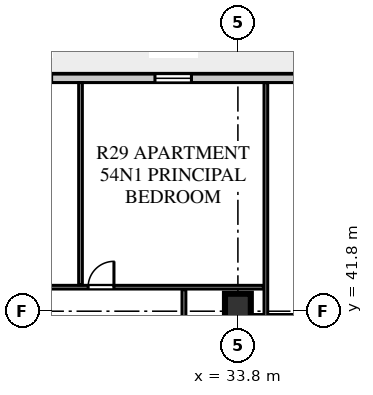
"""IFC4 building model, lengths in metres.
Left out: names, types, materials, properties, quantities, classifications, styles, units other than length and angle.
Written with IfcOpenShell. Run it as: python <this file> out.ifc"""

import sys

from ifc_helpers import new_model, si_unit, direction, frame, frame_2d, origin, origin_2d, place, context, subcontext, project, spatial, rectangle, extrude, element, fill, save


model = new_model("IFC4")
c1 = context("Model", 3, precision=1e-05, world=origin(), true_north=direction((0.0, 1.0)))
c2 = subcontext(c1, "Body", "Model", "MODEL_VIEW")
j1 = project(units=[si_unit("LENGTHUNIT", "METRE"), si_unit("PLANEANGLEUNIT", "RADIAN")], contexts=[c1])
p1 = place(None, origin())
s1 = spatial("IfcSite", under=j1, at=p1, CompositionType="ELEMENT")
p2 = place(p1, origin())
s2 = spatial("IfcBuilding", under=s1, at=p2, CompositionType="ELEMENT")
p3 = place(p2, frame((0.0, 0.0, 221.9)))
s3 = spatial("IfcBuildingStorey", under=s2, at=p3, CompositionType="ELEMENT", Elevation=221.9)
p4 = place(p3, frame((33.8, 41.95, 0.0), z_axis=(0.0, 0.0, 1.0), x_axis=(1.0, 0.0, 0.0)))
e1 = element("IfcColumn", 1, at=p4, inside=s3, PredefinedType="COLUMN", context=c2, shape_type="SweptSolid", body=[
    extrude(rectangle(XDim=0.85, YDim=0.85, at=origin_2d()), origin(), (0.0, 0.0, 1.0), 3.66),
])
p5 = place(p3, frame((45.55, 49.46, 0.0), z_axis=(0.0, 0.0, 1.0), x_axis=(-1.0, 0.0, 0.0)))
e2 = element("IfcWall", 2, at=p5, inside=s3, PredefinedType="STANDARD", context=c2, shape_type="SweptSolid", body=[
    extrude(rectangle(XDim=32.5, YDim=0.28, at=frame_2d((16.25, 0.0))), origin(), (0.0, 0.0, 1.0), 3.66),
])
p6 = place(p5, frame((30.55, 0.0, 0.0)))
e3 = element("IfcOpeningElement", 3, at=p6, cuts=e2, PredefinedType="OPENING", context=c2, shape_type="SweptSolid", body=[
    extrude(rectangle(XDim=1.0, YDim=2.05, at=frame_2d((0.5, 1.025))), frame((0.0, 0.15, 0.0), z_axis=(0.0, -1.0, 0.0), x_axis=(1.0, 0.0, 0.0)), (0.0, 0.0, 1.0), 0.3),
])
p7 = place(p5, frame((24.565, 0.0, 0.8)))
e4 = element("IfcOpeningElement", 4, at=p7, cuts=e2, PredefinedType="OPENING", context=c2, shape_type="SweptSolid", body=[
    extrude(rectangle(XDim=1.8, YDim=2.0, at=frame_2d((0.9, 1.0))), frame((0.0, 0.15, 0.0), z_axis=(0.0, -1.0, 0.0), x_axis=(1.0, 0.0, 0.0)), (0.0, 0.0, 1.0), 0.3),
])
p8 = place(p5, frame((17.878, 0.0, 0.8)))
e5 = element("IfcOpeningElement", 5, at=p8, cuts=e2, PredefinedType="OPENING", context=c2, shape_type="SweptSolid", body=[
    extrude(rectangle(XDim=1.5, YDim=2.0, at=frame_2d((0.75, 1.0))), frame((0.0, 0.15, 0.0), z_axis=(0.0, -1.0, 0.0), x_axis=(1.0, 0.0, 0.0)), (0.0, 0.0, 1.0), 0.3),
])
p9 = place(p5, frame((13.278, 0.0, 0.8)))
e6 = element("IfcOpeningElement", 6, at=p9, cuts=e2, PredefinedType="OPENING", context=c2, shape_type="SweptSolid", body=[
    extrude(rectangle(XDim=1.2, YDim=1.75, at=frame_2d((0.6, 0.875))), frame((0.0, 0.15, 0.0), z_axis=(0.0, -1.0, 0.0), x_axis=(1.0, 0.0, 0.0)), (0.0, 0.0, 1.0), 0.3),
])
p10 = place(p5, frame((4.27, 0.0, 0.8)))
e7 = element("IfcOpeningElement", 7, at=p10, cuts=e2, PredefinedType="OPENING", context=c2, shape_type="SweptSolid", body=[
    extrude(rectangle(XDim=2.4, YDim=2.05, at=frame_2d((1.2, 1.025))), frame((0.0, 0.15, 0.0), z_axis=(0.0, -1.0, 0.0), x_axis=(1.0, 0.0, 0.0)), (0.0, 0.0, 1.0), 0.3),
])
p11 = place(p3, frame((34.72, 35.22, 0.0), z_axis=(0.0, 0.0, 1.0), x_axis=(0.0, 1.0, 0.0)))
e8 = element("IfcWall", 8, at=p11, inside=s3, PredefinedType="PARTITIONING", context=c2, shape_type="SweptSolid", body=[
    extrude(rectangle(XDim=14.1, YDim=0.12, at=frame_2d((7.05, 0.0))), origin(), (0.0, 0.0, 1.0), 3.66),
])
p12 = place(p3, frame((25.3, 42.59, 0.0), z_axis=(0.0, 0.0, 1.0), x_axis=(1.0, 0.0, 0.0)))
e9 = element("IfcWall", 9, at=p12, inside=s3, PredefinedType="PARTITIONING", context=c2, shape_type="SweptSolid", body=[
    extrude(rectangle(XDim=9.34, YDim=0.12, at=frame_2d((4.67, 0.0))), origin(), (0.0, 0.0, 1.0), 3.66),
])
p13 = place(p12, frame((0.6, 0.0, 0.0)))
e10 = element("IfcOpeningElement", 10, at=p13, cuts=e9, PredefinedType="OPENING", context=c2, shape_type="SweptSolid", body=[
    extrude(rectangle(XDim=0.85, YDim=2.08, at=frame_2d((0.425, 1.04))), frame((0.0, 0.07, 0.0), z_axis=(0.0, -1.0, 0.0), x_axis=(1.0, 0.0, 0.0)), (0.0, 0.0, 1.0), 0.14),
])
p14 = place(p12, frame((3.573, 0.0, 0.0)))
e11 = element("IfcOpeningElement", 11, at=p14, cuts=e9, PredefinedType="OPENING", context=c2, shape_type="SweptSolid", body=[
    extrude(rectangle(XDim=0.85, YDim=2.08, at=frame_2d((0.425, 1.04))), frame((0.0, 0.07, 0.0), z_axis=(0.0, -1.0, 0.0), x_axis=(1.0, 0.0, 0.0)), (0.0, 0.0, 1.0), 0.14),
])
p15 = place(p3, frame((32.025, 35.3, 0.0), z_axis=(0.0, 0.0, 1.0), x_axis=(0.0, 1.0, 0.0)))
e12 = element("IfcWall", 12, at=p15, inside=s3, PredefinedType="PLUMBINGWALL", context=c2, shape_type="SweptSolid", body=[
    extrude(rectangle(XDim=7.21, YDim=0.125, at=frame_2d((3.605, 0.0))), origin(), (0.0, 0.0, 1.0), 3.66),
])
p16 = place(p15, frame((0.16, 0.0, 0.0)))
e13 = element("IfcOpeningElement", 13, at=p16, cuts=e12, PredefinedType="OPENING", context=c2, shape_type="SweptSolid", body=[
    extrude(rectangle(XDim=0.8, YDim=2.05, at=frame_2d((0.4, 1.025))), frame((0.0, 0.073, 0.0), z_axis=(0.0, -1.0, 0.0), x_axis=(1.0, 0.0, 0.0)), (0.0, 0.0, 1.0), 0.145),
])
p17 = place(p15, frame((3.741, 0.0, 0.0)))
e14 = element("IfcOpeningElement", 14, at=p17, cuts=e12, PredefinedType="OPENING", context=c2, shape_type="SweptSolid", body=[
    extrude(rectangle(XDim=0.85, YDim=2.08, at=frame_2d((0.425, 1.04))), frame((0.0, 0.073, 0.0), z_axis=(0.0, -1.0, 0.0), x_axis=(1.0, 0.0, 0.0)), (0.0, 0.0, 1.0), 0.145),
])
p18 = place(p3, frame((28.623, 42.67, 0.0), z_axis=(0.0, 0.0, 1.0), x_axis=(0.0, 1.0, 0.0)))
e15 = element("IfcWall", 15, at=p18, inside=s3, PredefinedType="PARTITIONING", context=c2, shape_type="SweptSolid", body=[
    extrude(rectangle(XDim=6.65, YDim=0.12, at=frame_2d((3.325, 0.0))), origin(), (0.0, 0.0, 1.0), 3.66),
])
p19 = place(p9, origin())
e16 = element("IfcWindow", 16, at=p19, inside=s3, PartitioningType="SINGLE_PANEL", PredefinedType="WINDOW", context=c2, shape_type="SweptSolid", body=[
    extrude(rectangle(XDim=1.2, YDim=1.75, at=frame_2d((0.6, 0.875))), frame((0.0, 0.03, 0.0), z_axis=(0.0, -1.0, 0.0), x_axis=(1.0, 0.0, 0.0)), (0.0, 0.0, 1.0), 0.06),
])
fill(e6, e16)
p20 = place(p14, origin())
e17 = element("IfcDoor", 17, at=p20, inside=s3, OperationType="SINGLE_SWING_RIGHT", PredefinedType="DOOR", context=c2, shape_type="SweptSolid", body=[
    extrude(rectangle(XDim=0.85, YDim=2.08, at=frame_2d((0.425, 1.04))), frame((0.0, 0.025, 0.0), z_axis=(0.0, -1.0, 0.0), x_axis=(1.0, 0.0, 0.0)), (0.0, 0.0, 1.0), 0.05),
])
fill(e11, e17)
save(model, sys.argv[1])
